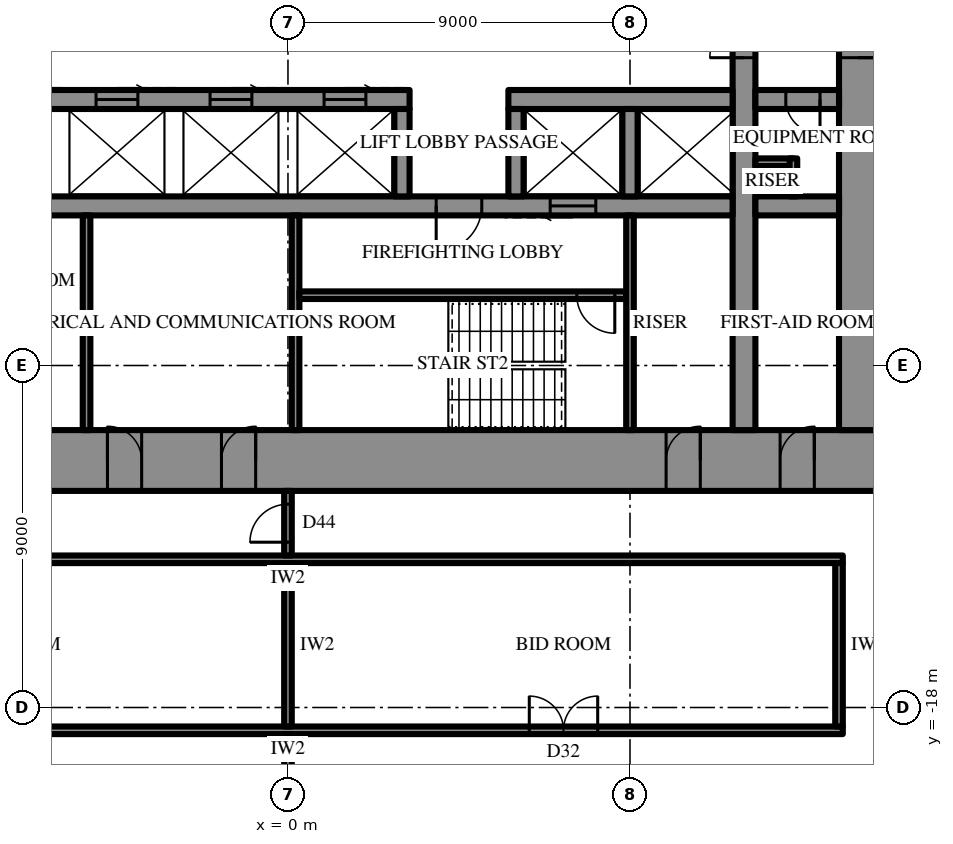
"""IFC4 building model, lengths in metres.
Left out: names, types, materials, properties, quantities, classifications, styles, units other than length and angle.
Written with IfcOpenShell. Run it as: python <this file> out.ifc"""

import sys

from ifc_helpers import new_model, si_unit, direction, frame, frame_2d, origin, place, context, subcontext, project, spatial, rectangle, extrude, element, fill, save


model = new_model("IFC4")
c1 = context("Model", 3, precision=1e-05, world=origin(), true_north=direction((0.0, 1.0)))
c2 = subcontext(c1, "Body", "Model", "MODEL_VIEW")
j1 = project(units=[si_unit("LENGTHUNIT", "METRE"), si_unit("PLANEANGLEUNIT", "RADIAN")], contexts=[c1])
p1 = place(None, origin())
s1 = spatial("IfcSite", under=j1, at=p1, CompositionType="ELEMENT")
p2 = place(p1, origin())
s2 = spatial("IfcBuilding", under=s1, at=p2, CompositionType="ELEMENT")
p3 = place(p2, frame((0.0, 0.0, 257.5)))
s3 = spatial("IfcBuildingStorey", under=s2, at=p3, CompositionType="ELEMENT", Elevation=257.5)
p4 = place(p3, frame((15.5, -11.5, 0.0), z_axis=(0.0, 0.0, 1.0), x_axis=(-1.0, 0.0, 0.0)))
e1 = element("IfcWall", 1, at=p4, inside=s3, PredefinedType="SHEAR", context=c2, shape_type="SweptSolid", body=[
    extrude(rectangle(XDim=31.0, YDim=1.6, at=frame_2d((15.5, 0.0))), origin(), (0.0, 0.0, 1.0), 4.2),
])
p5 = place(p4, frame((16.35, 0.0, 0.0)))
e2 = element("IfcOpeningElement", 2, at=p5, cuts=e1, PredefinedType="OPENING", context=c2, shape_type="SweptSolid", body=[
    extrude(rectangle(XDim=0.9, YDim=2.2, at=frame_2d((0.45, 1.1))), frame((0.0, 0.81, 0.0), z_axis=(0.0, -1.0, 0.0), x_axis=(1.0, 0.0, 0.0)), (0.0, 0.0, 1.0), 1.62),
])
p6 = place(p4, frame((19.35, 0.0, 0.0)))
e3 = element("IfcOpeningElement", 3, at=p6, cuts=e1, PredefinedType="OPENING", context=c2, shape_type="SweptSolid", body=[
    extrude(rectangle(XDim=0.9, YDim=2.2, at=frame_2d((0.45, 1.1))), frame((0.0, 0.81, 0.0), z_axis=(0.0, -1.0, 0.0), x_axis=(1.0, 0.0, 0.0)), (0.0, 0.0, 1.0), 1.62),
])
p7 = place(p4, frame((22.4, 0.0, 0.0)))
e4 = element("IfcOpeningElement", 4, at=p7, cuts=e1, PredefinedType="OPENING", context=c2, shape_type="SweptSolid", body=[
    extrude(rectangle(XDim=1.0, YDim=2.2, at=frame_2d((0.5, 1.1))), frame((0.0, 0.81, 0.0), z_axis=(0.0, -1.0, 0.0), x_axis=(1.0, 0.0, 0.0)), (0.0, 0.0, 1.0), 1.62),
])
p8 = place(p4, frame((1.65, 0.0, 0.0)))
e5 = element("IfcOpeningElement", 5, at=p8, cuts=e1, PredefinedType="OPENING", context=c2, shape_type="SweptSolid", body=[
    extrude(rectangle(XDim=0.9, YDim=2.2, at=frame_2d((0.45, 1.1))), frame((0.0, 0.81, 0.0), z_axis=(0.0, -1.0, 0.0), x_axis=(1.0, 0.0, 0.0)), (0.0, 0.0, 1.0), 1.62),
])
p9 = place(p4, frame((4.65, 0.0, 0.0)))
e6 = element("IfcOpeningElement", 6, at=p9, cuts=e1, PredefinedType="OPENING", context=c2, shape_type="SweptSolid", body=[
    extrude(rectangle(XDim=0.9, YDim=2.2, at=frame_2d((0.45, 1.1))), frame((0.0, 0.81, 0.0), z_axis=(0.0, -1.0, 0.0), x_axis=(1.0, 0.0, 0.0)), (0.0, 0.0, 1.0), 1.62),
])
p10 = place(p4, frame((25.45, 0.0, 0.0)))
e7 = element("IfcOpeningElement", 7, at=p10, cuts=e1, PredefinedType="OPENING", context=c2, shape_type="SweptSolid", body=[
    extrude(rectangle(XDim=0.9, YDim=2.2, at=frame_2d((0.45, 1.1))), frame((0.0, 0.81, 0.0), z_axis=(0.0, -1.0, 0.0), x_axis=(1.0, 0.0, 0.0)), (0.0, 0.0, 1.0), 1.62),
])
p11 = place(p4, frame((28.45, 0.0, 0.0)))
e8 = element("IfcOpeningElement", 8, at=p11, cuts=e1, PredefinedType="OPENING", context=c2, shape_type="SweptSolid", body=[
    extrude(rectangle(XDim=0.9, YDim=2.2, at=frame_2d((0.45, 1.1))), frame((0.0, 0.81, 0.0), z_axis=(0.0, -1.0, 0.0), x_axis=(1.0, 0.0, 0.0)), (0.0, 0.0, 1.0), 1.62),
])
p12 = place(p3, frame((15.0, -10.7, 0.0), z_axis=(0.0, 0.0, 1.0), x_axis=(0.0, 1.0, 0.0)))
e9 = element("IfcWall", 9, at=p12, inside=s3, PredefinedType="SHEAR", context=c2, shape_type="SweptSolid", body=[
    extrude(rectangle(XDim=21.4, YDim=1.0, at=frame_2d((10.7, 0.0))), origin(), (0.0, 0.0, 1.0), 4.2),
])
p13 = place(p12, frame((9.8, 0.0, 0.0)))
e10 = element("IfcOpeningElement", 10, at=p13, cuts=e9, PredefinedType="OPENING", context=c2, shape_type="SweptSolid", body=[
    extrude(rectangle(XDim=1.8, YDim=2.4, at=frame_2d((0.9, 1.2))), frame((0.0, 0.51, 0.0), z_axis=(0.0, -1.0, 0.0), x_axis=(1.0, 0.0, 0.0)), (0.0, 0.0, 1.0), 1.02),
])
p14 = place(p3, frame((12.0, -10.7, 0.0), z_axis=(0.0, 0.0, 1.0), x_axis=(0.0, 1.0, 0.0)))
e11 = element("IfcWall", 11, at=p14, inside=s3, PredefinedType="SHEAR", context=c2, shape_type="SweptSolid", body=[
    extrude(rectangle(XDim=21.4, YDim=0.6, at=frame_2d((10.7, 0.0))), origin(), (0.0, 0.0, 1.0), 4.2),
])
p15 = place(p14, frame((9.8, 0.0, 0.0)))
e12 = element("IfcOpeningElement", 12, at=p15, cuts=e11, PredefinedType="OPENING", context=c2, shape_type="SweptSolid", body=[
    extrude(rectangle(XDim=1.8, YDim=2.4, at=frame_2d((0.9, 1.2))), frame((0.0, 0.31, 0.0), z_axis=(0.0, -1.0, 0.0), x_axis=(1.0, 0.0, 0.0)), (0.0, 0.0, 1.0), 0.62),
])
p16 = place(p3, frame((14.5, -2.0, 0.0), z_axis=(0.0, 0.0, 1.0), x_axis=(-1.0, 0.0, 0.0)))
e13 = element("IfcWall", 13, at=p16, inside=s3, PredefinedType="SHEAR", context=c2, shape_type="SweptSolid", body=[
    extrude(rectangle(XDim=2.2, YDim=0.5, at=frame_2d((1.1, 0.0))), origin(), (0.0, 0.0, 1.0), 4.2),
])
p17 = place(p16, frame((0.5, 0.0, 0.0)))
e14 = element("IfcOpeningElement", 14, at=p17, cuts=e13, PredefinedType="OPENING", context=c2, shape_type="SweptSolid", body=[
    extrude(rectangle(XDim=0.9, YDim=2.2, at=frame_2d((0.45, 1.1))), frame((0.0, 0.26, 0.0), z_axis=(0.0, -1.0, 0.0), x_axis=(1.0, 0.0, 0.0)), (0.0, 0.0, 1.0), 0.52),
])
p18 = place(p3, frame((11.7, -2.0, 0.0), z_axis=(0.0, 0.0, 1.0), x_axis=(-1.0, 0.0, 0.0)))
e15 = element("IfcWall", 15, at=p18, inside=s3, PredefinedType="SHEAR", context=c2, shape_type="SweptSolid", body=[
    extrude(rectangle(XDim=5.9, YDim=0.5, at=frame_2d((2.95, 0.0))), origin(), (0.0, 0.0, 1.0), 4.2),
])
p19 = place(p3, frame((3.2, -2.0, 0.0), z_axis=(0.0, 0.0, 1.0), x_axis=(-1.0, 0.0, 0.0)))
e16 = element("IfcWall", 16, at=p19, inside=s3, PredefinedType="SHEAR", context=c2, shape_type="SweptSolid", body=[
    extrude(rectangle(XDim=14.9, YDim=0.5, at=frame_2d((7.45, 0.0))), origin(), (0.0, 0.0, 1.0), 4.2),
])
p20 = place(p19, frame((1.15, 0.0, 0.0)))
e17 = element("IfcOpeningElement", 17, at=p20, cuts=e16, PredefinedType="OPENING", context=c2, shape_type="SweptSolid", body=[
    extrude(rectangle(XDim=1.1, YDim=2.2, at=frame_2d((0.55, 1.1))), frame((0.0, 0.26, 0.0), z_axis=(0.0, -1.0, 0.0), x_axis=(1.0, 0.0, 0.0)), (0.0, 0.0, 1.0), 0.52),
])
p21 = place(p19, frame((4.15, 0.0, 0.0)))
e18 = element("IfcOpeningElement", 18, at=p21, cuts=e16, PredefinedType="OPENING", context=c2, shape_type="SweptSolid", body=[
    extrude(rectangle(XDim=1.1, YDim=2.2, at=frame_2d((0.55, 1.1))), frame((0.0, 0.26, 0.0), z_axis=(0.0, -1.0, 0.0), x_axis=(1.0, 0.0, 0.0)), (0.0, 0.0, 1.0), 0.52),
])
p22 = place(p19, frame((7.15, 0.0, 0.0)))
e19 = element("IfcOpeningElement", 19, at=p22, cuts=e16, PredefinedType="OPENING", context=c2, shape_type="SweptSolid", body=[
    extrude(rectangle(XDim=1.1, YDim=2.2, at=frame_2d((0.55, 1.1))), frame((0.0, 0.26, 0.0), z_axis=(0.0, -1.0, 0.0), x_axis=(1.0, 0.0, 0.0)), (0.0, 0.0, 1.0), 0.52),
])
p23 = place(p19, frame((10.15, 0.0, 0.0)))
e20 = element("IfcOpeningElement", 20, at=p23, cuts=e16, PredefinedType="OPENING", context=c2, shape_type="SweptSolid", body=[
    extrude(rectangle(XDim=1.1, YDim=2.2, at=frame_2d((0.55, 1.1))), frame((0.0, 0.26, 0.0), z_axis=(0.0, -1.0, 0.0), x_axis=(1.0, 0.0, 0.0)), (0.0, 0.0, 1.0), 0.52),
])
p24 = place(p3, frame((14.5, -4.8, 0.0), z_axis=(0.0, 0.0, 1.0), x_axis=(-1.0, 0.0, 0.0)))
e21 = element("IfcWall", 21, at=p24, inside=s3, PredefinedType="SHEAR", context=c2, shape_type="SweptSolid", body=[
    extrude(rectangle(XDim=2.2, YDim=0.5, at=frame_2d((1.1, 0.0))), origin(), (0.0, 0.0, 1.0), 4.2),
])
p25 = place(p3, frame((11.7, -4.8, 0.0), z_axis=(0.0, 0.0, 1.0), x_axis=(-1.0, 0.0, 0.0)))
e22 = element("IfcWall", 22, at=p25, inside=s3, PredefinedType="SHEAR", context=c2, shape_type="SweptSolid", body=[
    extrude(rectangle(XDim=23.4, YDim=0.5, at=frame_2d((11.7, 0.0))), origin(), (0.0, 0.0, 1.0), 4.2),
])
p26 = place(p25, frame((6.6, 0.0, 0.0)))
e23 = element("IfcOpeningElement", 23, at=p26, cuts=e22, PredefinedType="OPENING", context=c2, shape_type="SweptSolid", body=[
    extrude(rectangle(XDim=1.2, YDim=2.2, at=frame_2d((0.6, 1.1))), frame((0.0, 0.26, 0.0), z_axis=(0.0, -1.0, 0.0), x_axis=(1.0, 0.0, 0.0)), (0.0, 0.0, 1.0), 0.52),
])
p27 = place(p25, frame((3.6, 0.0, 0.0)))
e24 = element("IfcOpeningElement", 24, at=p27, cuts=e22, PredefinedType="OPENING", context=c2, shape_type="SweptSolid", body=[
    extrude(rectangle(XDim=1.2, YDim=2.2, at=frame_2d((0.6, 1.1))), frame((0.0, 0.26, 0.0), z_axis=(0.0, -1.0, 0.0), x_axis=(1.0, 0.0, 0.0)), (0.0, 0.0, 1.0), 0.52),
])
for number, where, z_axis, x_axis in (
    (25, (9.0, -2.25, 0.0), (0.0, 0.0, 1.0), (0.0, -1.0, 0.0)),
    (26, (6.0, -2.25, 0.0), (0.0, 0.0, 1.0), (0.0, -1.0, 0.0)),
    (27, (3.0, -2.25, 0.0), (0.0, 0.0, 1.0), (0.0, -1.0, 0.0)),
):
    element("IfcWall", number, at=place(p3, frame(where, z_axis=z_axis, x_axis=x_axis)), inside=s3, PredefinedType="SHEAR", context=c2, shape_type="SweptSolid", body=[
        extrude(rectangle(XDim=2.3, YDim=0.4, at=frame_2d((1.15, 0.0))), origin(), (0.0, 0.0, 1.0), 4.2),
    ])
p28 = place(p3, frame((0.2, -5.05, 0.0), z_axis=(0.0, 0.0, 1.0), x_axis=(0.0, -1.0, 0.0)))
e28 = element("IfcWall", 28, at=p28, inside=s3, PredefinedType="SHEAR", context=c2, shape_type="SweptSolid", body=[
    extrude(rectangle(XDim=5.65, YDim=0.2, at=frame_2d((2.825, 0.0))), origin(), (0.0, 0.0, 1.0), 4.2),
])
p29 = place(p3, frame((8.9, -7.15, 0.0), z_axis=(0.0, 0.0, 1.0), x_axis=(-1.0, 0.0, 0.0)))
e29 = element("IfcWall", 29, at=p29, inside=s3, PredefinedType="SHEAR", context=c2, shape_type="SweptSolid", body=[
    extrude(rectangle(XDim=8.6, YDim=0.2, at=frame_2d((4.3, 0.0))), origin(), (0.0, 0.0, 1.0), 4.2),
])
p30 = place(p29, frame((0.3, 0.0, 0.0)))
e30 = element("IfcOpeningElement", 30, at=p30, cuts=e29, PredefinedType="OPENING", context=c2, shape_type="SweptSolid", body=[
    extrude(rectangle(XDim=1.0, YDim=2.2, at=frame_2d((0.5, 1.1))), frame((0.0, 0.11, 0.0), z_axis=(0.0, -1.0, 0.0), x_axis=(1.0, 0.0, 0.0)), (0.0, 0.0, 1.0), 0.22),
])
for number, where, z_axis, x_axis in (
    (31, (9.0, -5.05, 0.0), (0.0, 0.0, 1.0), (0.0, -1.0, 0.0)),
    (32, (-5.3, -5.05, 0.0), (0.0, 0.0, 1.0), (0.0, -1.0, 0.0)),
):
    element("IfcWall", number, at=place(p3, frame(where, z_axis=z_axis, x_axis=x_axis)), inside=s3, PredefinedType="PARTITIONING", context=c2, shape_type="SweptSolid", body=[
        extrude(rectangle(XDim=5.65, YDim=0.2, at=frame_2d((2.825, 0.0))), origin(), (0.0, 0.0, 1.0), 4.0),
    ])
for number, where, z_axis, x_axis in (
    (33, (13.3, -3.65, 0.0), (0.0, 0.0, 1.0), (-1.0, 0.0, 0.0)),
    (34, (13.3, -3.55, 0.0), (0.0, 0.0, 1.0), (0.0, -1.0, 0.0)),
):
    element("IfcWall", number, at=place(p3, frame(where, z_axis=z_axis, x_axis=x_axis)), inside=s3, PredefinedType="PARTITIONING", context=c2, shape_type="SweptSolid", body=[
        extrude(rectangle(XDim=1.0, YDim=0.2, at=frame_2d((0.5, 0.0))), origin(), (0.0, 0.0, 1.0), 4.0),
    ])
p31 = place(p3, frame((14.6, -14.1, 0.0), z_axis=(0.0, 0.0, 1.0), x_axis=(-1.0, 0.0, 0.0)))
e35 = element("IfcWall", 35, at=p31, inside=s3, PredefinedType="PARTITIONING", context=c2, shape_type="SweptSolid", body=[
    extrude(rectangle(XDim=29.2, YDim=0.2, at=frame_2d((14.6, 0.0))), origin(), (0.0, 0.0, 1.0), 4.0),
])
p32 = place(p3, frame((14.6, -18.6, 0.0), z_axis=(0.0, 0.0, 1.0), x_axis=(-1.0, 0.0, 0.0)))
e36 = element("IfcWall", 36, at=p32, inside=s3, PredefinedType="PARTITIONING", context=c2, shape_type="SweptSolid", body=[
    extrude(rectangle(XDim=29.2, YDim=0.2, at=frame_2d((14.6, 0.0))), origin(), (0.0, 0.0, 1.0), 4.0),
])
p33 = place(p32, frame((6.45, 0.0, 0.0)))
e37 = element("IfcOpeningElement", 37, at=p33, cuts=e36, PredefinedType="OPENING", context=c2, shape_type="SweptSolid", body=[
    extrude(rectangle(XDim=1.8, YDim=2.4, at=frame_2d((0.9, 1.2))), frame((0.0, 0.11, 0.0), z_axis=(0.0, -1.0, 0.0), x_axis=(1.0, 0.0, 0.0)), (0.0, 0.0, 1.0), 0.22),
])
p34 = place(p32, frame((20.95, 0.0, 0.0)))
e38 = element("IfcOpeningElement", 38, at=p34, cuts=e36, PredefinedType="OPENING", context=c2, shape_type="SweptSolid", body=[
    extrude(rectangle(XDim=1.8, YDim=2.4, at=frame_2d((0.9, 1.2))), frame((0.0, 0.11, 0.0), z_axis=(0.0, -1.0, 0.0), x_axis=(1.0, 0.0, 0.0)), (0.0, 0.0, 1.0), 0.22),
])
p35 = place(p3, frame((14.5, -14.2, 0.0), z_axis=(0.0, 0.0, 1.0), x_axis=(0.0, -1.0, 0.0)))
e39 = element("IfcWall", 39, at=p35, inside=s3, PredefinedType="PARTITIONING", context=c2, shape_type="SweptSolid", body=[
    extrude(rectangle(XDim=4.3, YDim=0.2, at=frame_2d((2.15, 0.0))), origin(), (0.0, 0.0, 1.0), 4.0),
])
p36 = place(p3, frame((0.0, -14.2, 0.0), z_axis=(0.0, 0.0, 1.0), x_axis=(0.0, -1.0, 0.0)))
e40 = element("IfcWall", 40, at=p36, inside=s3, PredefinedType="PARTITIONING", context=c2, shape_type="SweptSolid", body=[
    extrude(rectangle(XDim=4.3, YDim=0.2, at=frame_2d((2.15, 0.0))), origin(), (0.0, 0.0, 1.0), 2.992),
])
p37 = place(p3, frame((0.0, -12.3, 0.0), z_axis=(0.0, 0.0, 1.0), x_axis=(0.0, -1.0, 0.0)))
e41 = element("IfcWall", 41, at=p37, inside=s3, PredefinedType="PARTITIONING", context=c2, shape_type="SweptSolid", body=[
    extrude(rectangle(XDim=1.7, YDim=0.2, at=frame_2d((0.85, 0.0))), origin(), (0.0, 0.0, 1.0), 2.992),
])
p38 = place(p37, frame((0.35, 0.0, 0.0)))
e42 = element("IfcOpeningElement", 42, at=p38, cuts=e41, PredefinedType="OPENING", context=c2, shape_type="SweptSolid", body=[
    extrude(rectangle(XDim=1.0, YDim=2.2, at=frame_2d((0.5, 1.1))), frame((0.0, 0.11, 0.0), z_axis=(0.0, -1.0, 0.0), x_axis=(1.0, 0.0, 0.0)), (0.0, 0.0, 1.0), 0.22),
])
p39 = place(p3, frame((0.0, -18.7, 0.0), z_axis=(0.0, 0.0, 1.0), x_axis=(0.0, -1.0, 0.0)))
e43 = element("IfcWall", 43, at=p39, inside=s3, PredefinedType="PARTITIONING", context=c2, shape_type="SweptSolid", body=[
    extrude(rectangle(XDim=9.15, YDim=0.2, at=frame_2d((4.575, 0.0))), origin(), (0.0, 0.0, 1.0), 2.992),
])
p40 = place(p13, frame((1.8, 0.0, 0.0), z_axis=(0.0, 0.0, 1.0), x_axis=(-1.0, 0.0, 0.0)))
e44 = element("IfcDoor", 44, at=p40, inside=s3, OperationType="DOUBLE_DOOR_SINGLE_SWING", PredefinedType="DOOR", context=c2, shape_type="SweptSolid", body=[
    extrude(rectangle(XDim=1.8, YDim=2.4, at=frame_2d((0.9, 1.2))), frame((0.0, 0.025, 0.0), z_axis=(0.0, -1.0, 0.0), x_axis=(1.0, 0.0, 0.0)), (0.0, 0.0, 1.0), 0.05),
])
fill(e10, e44)
p41 = place(p26, origin())
e45 = element("IfcDoor", 45, at=p41, inside=s3, OperationType="SINGLE_SWING_LEFT", PredefinedType="DOOR", context=c2, shape_type="SweptSolid", body=[
    extrude(rectangle(XDim=1.2, YDim=2.2, at=frame_2d((0.6, 1.1))), frame((0.0, 0.025, 0.0), z_axis=(0.0, -1.0, 0.0), x_axis=(1.0, 0.0, 0.0)), (0.0, 0.0, 1.0), 0.05),
])
fill(e23, e45)
p42 = place(p30, origin())
e46 = element("IfcDoor", 46, at=p42, inside=s3, OperationType="SINGLE_SWING_RIGHT", PredefinedType="DOOR", context=c2, shape_type="SweptSolid", body=[
    extrude(rectangle(XDim=1.0, YDim=2.2, at=frame_2d((0.5, 1.1))), frame((0.0, 0.025, 0.0), z_axis=(0.0, -1.0, 0.0), x_axis=(1.0, 0.0, 0.0)), (0.0, 0.0, 1.0), 0.05),
])
fill(e30, e46)
p43 = place(p5, frame((0.9, 0.0, 0.0), z_axis=(0.0, 0.0, 1.0), x_axis=(-1.0, 0.0, 0.0)))
e47 = element("IfcDoor", 47, at=p43, inside=s3, OperationType="SINGLE_SWING_LEFT", PredefinedType="DOOR", context=c2, shape_type="SweptSolid", body=[
    extrude(rectangle(XDim=0.9, YDim=2.2, at=frame_2d((0.45, 1.1))), frame((0.0, 0.025, 0.0), z_axis=(0.0, -1.0, 0.0), x_axis=(1.0, 0.0, 0.0)), (0.0, 0.0, 1.0), 0.05),
])
fill(e2, e47)
p44 = place(p6, frame((0.9, 0.0, 0.0), z_axis=(0.0, 0.0, 1.0), x_axis=(-1.0, 0.0, 0.0)))
e48 = element("IfcDoor", 48, at=p44, inside=s3, OperationType="SINGLE_SWING_RIGHT", PredefinedType="DOOR", context=c2, shape_type="SweptSolid", body=[
    extrude(rectangle(XDim=0.9, YDim=2.2, at=frame_2d((0.45, 1.1))), frame((0.0, 0.025, 0.0), z_axis=(0.0, -1.0, 0.0), x_axis=(1.0, 0.0, 0.0)), (0.0, 0.0, 1.0), 0.05),
])
fill(e3, e48)
p45 = place(p8, frame((0.9, 0.0, 0.0), z_axis=(0.0, 0.0, 1.0), x_axis=(-1.0, 0.0, 0.0)))
e49 = element("IfcDoor", 49, at=p45, inside=s3, OperationType="SINGLE_SWING_LEFT", PredefinedType="DOOR", context=c2, shape_type="SweptSolid", body=[
    extrude(rectangle(XDim=0.9, YDim=2.2, at=frame_2d((0.45, 1.1))), frame((0.0, 0.025, 0.0), z_axis=(0.0, -1.0, 0.0), x_axis=(1.0, 0.0, 0.0)), (0.0, 0.0, 1.0), 0.05),
])
fill(e5, e49)
p46 = place(p9, frame((0.9, 0.0, 0.0), z_axis=(0.0, 0.0, 1.0), x_axis=(-1.0, 0.0, 0.0)))
e50 = element("IfcDoor", 50, at=p46, inside=s3, OperationType="SINGLE_SWING_LEFT", PredefinedType="DOOR", context=c2, shape_type="SweptSolid", body=[
    extrude(rectangle(XDim=0.9, YDim=2.2, at=frame_2d((0.45, 1.1))), frame((0.0, 0.025, 0.0), z_axis=(0.0, -1.0, 0.0), x_axis=(1.0, 0.0, 0.0)), (0.0, 0.0, 1.0), 0.05),
])
fill(e6, e50)
p47 = place(p17, origin())
e51 = element("IfcDoor", 51, at=p47, inside=s3, OperationType="SINGLE_SWING_RIGHT", PredefinedType="DOOR", context=c2, shape_type="SweptSolid", body=[
    extrude(rectangle(XDim=0.9, YDim=2.2, at=frame_2d((0.45, 1.1))), frame((0.0, 0.025, 0.0), z_axis=(0.0, -1.0, 0.0), x_axis=(1.0, 0.0, 0.0)), (0.0, 0.0, 1.0), 0.05),
])
fill(e14, e51)
p48 = place(p15, origin())
e52 = element("IfcDoor", 52, at=p48, inside=s3, OperationType="DOUBLE_DOOR_SINGLE_SWING", PredefinedType="DOOR", context=c2, shape_type="SweptSolid", body=[
    extrude(rectangle(XDim=1.8, YDim=2.4, at=frame_2d((0.9, 1.2))), frame((0.0, 0.025, 0.0), z_axis=(0.0, -1.0, 0.0), x_axis=(1.0, 0.0, 0.0)), (0.0, 0.0, 1.0), 0.05),
])
fill(e12, e52)
p49 = place(p27, origin())
e53 = element("IfcDoor", 53, at=p49, inside=s3, OperationType="SLIDING_TO_LEFT", PredefinedType="DOOR", context=c2, shape_type="SweptSolid", body=[
    extrude(rectangle(XDim=1.2, YDim=2.2, at=frame_2d((0.6, 1.1))), frame((0.0, 0.025, 0.0), z_axis=(0.0, -1.0, 0.0), x_axis=(1.0, 0.0, 0.0)), (0.0, 0.0, 1.0), 0.05),
])
fill(e24, e53)
p50 = place(p20, frame((1.1, 0.0, 0.0), z_axis=(0.0, 0.0, 1.0), x_axis=(-1.0, 0.0, 0.0)))
e54 = element("IfcDoor", 54, at=p50, inside=s3, OperationType="SLIDING_TO_LEFT", PredefinedType="DOOR", context=c2, shape_type="SweptSolid", body=[
    extrude(rectangle(XDim=1.1, YDim=2.2, at=frame_2d((0.55, 1.1))), frame((0.0, 0.025, 0.0), z_axis=(0.0, -1.0, 0.0), x_axis=(1.0, 0.0, 0.0)), (0.0, 0.0, 1.0), 0.05),
])
fill(e17, e54)
p51 = place(p21, frame((1.1, 0.0, 0.0), z_axis=(0.0, 0.0, 1.0), x_axis=(-1.0, 0.0, 0.0)))
e55 = element("IfcDoor", 55, at=p51, inside=s3, OperationType="SLIDING_TO_LEFT", PredefinedType="DOOR", context=c2, shape_type="SweptSolid", body=[
    extrude(rectangle(XDim=1.1, YDim=2.2, at=frame_2d((0.55, 1.1))), frame((0.0, 0.025, 0.0), z_axis=(0.0, -1.0, 0.0), x_axis=(1.0, 0.0, 0.0)), (0.0, 0.0, 1.0), 0.05),
])
fill(e18, e55)
p52 = place(p22, frame((1.1, 0.0, 0.0), z_axis=(0.0, 0.0, 1.0), x_axis=(-1.0, 0.0, 0.0)))
e56 = element("IfcDoor", 56, at=p52, inside=s3, OperationType="SLIDING_TO_LEFT", PredefinedType="DOOR", context=c2, shape_type="SweptSolid", body=[
    extrude(rectangle(XDim=1.1, YDim=2.2, at=frame_2d((0.55, 1.1))), frame((0.0, 0.025, 0.0), z_axis=(0.0, -1.0, 0.0), x_axis=(1.0, 0.0, 0.0)), (0.0, 0.0, 1.0), 0.05),
])
fill(e19, e56)
p53 = place(p33, frame((1.8, 0.0, 0.0), z_axis=(0.0, 0.0, 1.0), x_axis=(-1.0, 0.0, 0.0)))
e57 = element("IfcDoor", 57, at=p53, inside=s3, OperationType="DOUBLE_DOOR_SINGLE_SWING", PredefinedType="DOOR", context=c2, shape_type="SweptSolid", body=[
    extrude(rectangle(XDim=1.8, YDim=2.4, at=frame_2d((0.9, 1.2))), frame((0.0, 0.025, 0.0), z_axis=(0.0, -1.0, 0.0), x_axis=(1.0, 0.0, 0.0)), (0.0, 0.0, 1.0), 0.05),
])
fill(e37, e57)
p54 = place(p38, frame((1.0, 0.0, 0.0), z_axis=(0.0, 0.0, 1.0), x_axis=(-1.0, 0.0, 0.0)))
e58 = element("IfcDoor", 58, at=p54, inside=s3, OperationType="SINGLE_SWING_RIGHT", PredefinedType="DOOR", context=c2, shape_type="SweptSolid", body=[
    extrude(rectangle(XDim=1.0, YDim=2.2, at=frame_2d((0.5, 1.1))), frame((0.0, 0.025, 0.0), z_axis=(0.0, -1.0, 0.0), x_axis=(1.0, 0.0, 0.0)), (0.0, 0.0, 1.0), 0.05),
])
fill(e42, e58)
save(model, sys.argv[1])
